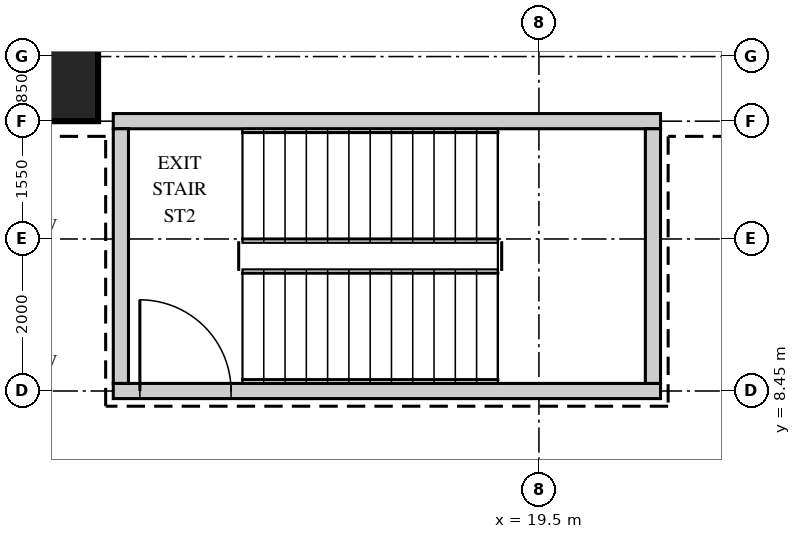
"""IFC4 building model, lengths in metres.
Left out: names, types, materials, properties, quantities, classifications, styles, units other than length and angle.
Written with IfcOpenShell. Run it as: python <this file> out.ifc"""

import sys

from ifc_helpers import new_model, si_unit, direction, frame, frame_2d, origin, origin_2d, place, context, subcontext, project, spatial, rectangle, extrude, source, transform, mapped, element, fill, save


model = new_model("IFC4")
c1 = context("Model", 3, precision=1e-05, world=origin(), true_north=direction((0.0, 1.0)))
c2 = subcontext(c1, "Body", "Model", "MODEL_VIEW")
j1 = project(units=[si_unit("LENGTHUNIT", "METRE"), si_unit("PLANEANGLEUNIT", "RADIAN")], contexts=[c1])
p1 = place(None, origin())
s1 = spatial("IfcSite", under=j1, at=p1, CompositionType="ELEMENT")
p2 = place(p1, origin())
s2 = spatial("IfcBuilding", under=s1, at=p2, CompositionType="ELEMENT")
p3 = place(p2, frame((0.0, 0.0, 330.2)))
s3 = spatial("IfcBuildingStorey", under=s2, at=p3, CompositionType="ELEMENT", Elevation=330.2)
m1 = source(origin(), c2, "Body", "SweptSolid", [
    extrude(rectangle(XDim=7.2, YDim=0.2, at=frame_2d((3.6, 0.0))), origin(), (0.0, 0.0, 1.0), 4.25),
])
p4 = place(p3, frame((13.9, 12.0, 0.0), z_axis=(0.0, 0.0, 1.0), x_axis=(1.0, 0.0, 0.0)))
e1 = element("IfcWall", 1, at=p4, inside=s3, PredefinedType="SHEAR", context=c2, shape_type="MappedRepresentation", body=[
    mapped(m1, transform((0.0, 0.0, 0.0))),
])
p5 = place(p3, frame((13.9, 8.45, 0.0), z_axis=(0.0, 0.0, 1.0), x_axis=(1.0, 0.0, 0.0)))
e2 = element("IfcWall", 2, at=p5, inside=s3, PredefinedType="SHEAR", context=c2, shape_type="MappedRepresentation", body=[
    mapped(m1, transform((0.0, 0.0, 0.0))),
])
m2 = source(origin(), c2, "Body", "SweptSolid", [
    extrude(rectangle(XDim=1.2, YDim=2.1, at=frame_2d((0.6, 1.05))), frame((0.0, 0.11, 0.0), z_axis=(0.0, -1.0, 0.0), x_axis=(1.0, 0.0, 0.0)), (0.0, 0.0, 1.0), 0.22),
])
p6 = place(p5, frame((0.35, 0.0, 0.0)))
e3 = element("IfcOpeningElement", 3, at=p6, cuts=e2, PredefinedType="OPENING", context=c2, shape_type="MappedRepresentation", body=[
    mapped(m2, transform((0.0, 0.0, 0.0))),
])
m3 = source(origin(), c2, "Body", "SweptSolid", [
    extrude(rectangle(XDim=3.35, YDim=0.2, at=frame_2d((1.675, 0.0))), origin(), (0.0, 0.0, 1.0), 4.25),
])
for number, where, z_axis, x_axis in (
    (4, (21.0, 8.55, 0.0), (0.0, 0.0, 1.0), (0.0, 1.0, 0.0)),
    (5, (14.0, 8.55, 0.0), (0.0, 0.0, 1.0), (0.0, 1.0, 0.0)),
):
    element("IfcWall", number, at=place(p3, frame(where, z_axis=z_axis, x_axis=x_axis)), inside=s3, PredefinedType="SHEAR", context=c2, shape_type="MappedRepresentation", body=[
        mapped(m3, transform((0.0, 0.0, 0.0))),
    ])
m4 = source(origin(), c2, "Body", "SweptSolid", [
    extrude(rectangle(XDim=1.7, YDim=1.7, at=origin_2d()), origin(), (0.0, 0.0, 1.0), 4.5),
])
p7 = place(p3, frame((12.85, 12.85, 0.0), z_axis=(0.0, 0.0, 1.0), x_axis=(1.0, 0.0, 0.0)))
e6 = element("IfcColumn", 6, at=p7, inside=s3, PredefinedType="COLUMN", context=c2, shape_type="MappedRepresentation", body=[
    mapped(m4, transform((0.0, 0.0, 0.0))),
])
m5 = source(origin(), c2, "Body", "SweptSolid", [
    extrude(rectangle(XDim=1.2, YDim=2.1, at=frame_2d((0.6, 1.05))), frame((0.0, 0.025, 0.0), z_axis=(0.0, -1.0, 0.0), x_axis=(1.0, 0.0, 0.0)), (0.0, 0.0, 1.0), 0.05),
])
p8 = place(p6, origin())
e7 = element("IfcDoor", 7, at=p8, inside=s3, OperationType="SINGLE_SWING_RIGHT", PredefinedType="DOOR", context=c2, shape_type="MappedRepresentation", body=[
    mapped(m5, transform((0.0, 0.0, 0.0))),
])
fill(e3, e7)
save(model, sys.argv[1])
